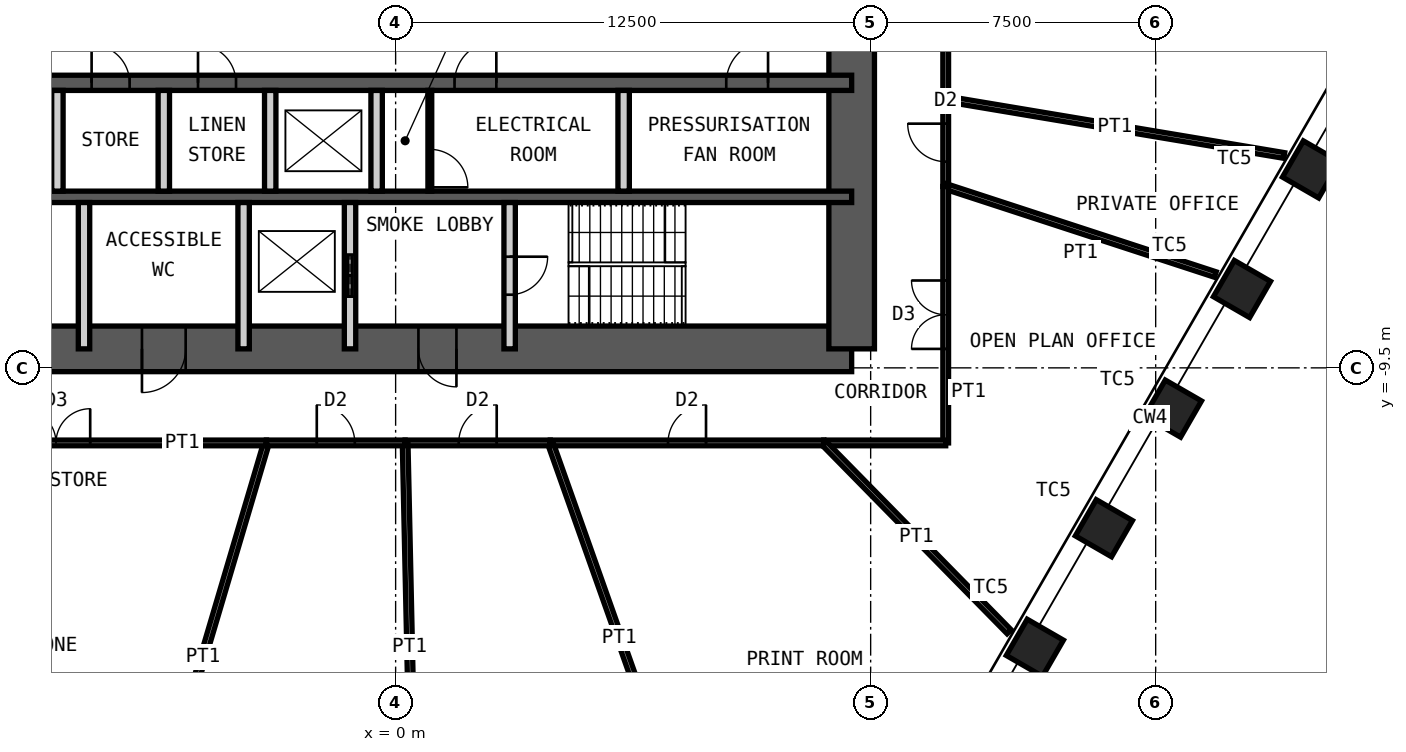
"""IFC4 building model, lengths in metres.
Left out: names, types, materials, properties, quantities, classifications, styles, units other than length and angle.
Written with IfcOpenShell. Run it as: python <this file> out.ifc"""

import sys

from ifc_helpers import new_model, si_unit, direction, frame, frame_2d, origin, origin_2d, place, context, subcontext, project, spatial, rectangle, hollow_rectangle, extrude, element, fill, save


model = new_model("IFC4")
c1 = context("Model", 3, precision=1e-05, world=origin(), true_north=direction((0.0, 1.0)))
c2 = subcontext(c1, "Body", "Model", "MODEL_VIEW")
j1 = project(units=[si_unit("LENGTHUNIT", "METRE"), si_unit("PLANEANGLEUNIT", "RADIAN")], contexts=[c1])
p1 = place(None, origin())
s1 = spatial("IfcSite", under=j1, at=p1, CompositionType="ELEMENT")
p2 = place(p1, origin())
s2 = spatial("IfcBuilding", under=s1, at=p2, CompositionType="ELEMENT")
p3 = place(p2, frame((0.0, 0.0, 209.8)))
s3 = spatial("IfcBuildingStorey", under=s2, at=p3, CompositionType="ELEMENT", Elevation=209.8)
for number, where, z_axis, x_axis in (
    (1, (24.088, -4.279, 0.0), (0.0, 0.0, 1.0), (0.5, 0.866, 0.0)),
    (2, (22.271, -7.426, 0.0), (0.0, 0.0, 1.0), (0.5, 0.866, 0.0)),
    (3, (20.454, -10.572, 0.0), (0.0, 0.0, 1.0), (0.5, 0.866, 0.0)),
    (4, (18.637, -13.719, 0.0), (0.0, 0.0, 1.0), (0.5, 0.866, 0.0)),
    (5, (16.821, -16.866, 0.0), (0.0, 0.0, 1.0), (0.5, 0.866, 0.0)),
):
    element("IfcColumn", number, at=place(p3, frame(where, z_axis=z_axis, x_axis=x_axis)), inside=s3, PredefinedType="COLUMN", context=c2, shape_type="SweptSolid", body=[
        extrude(hollow_rectangle(XDim=1.1, YDim=1.1, WallThickness=0.07, at=origin_2d()), origin(), (0.0, 0.0, 1.0), 4.2),
    ])
p4 = place(p3, frame((-12.0, -9.0, 0.0), z_axis=(0.0, 0.0, 1.0), x_axis=(1.0, 0.0, 0.0)))
e6 = element("IfcWall", 6, at=p4, inside=s3, PredefinedType="SHEAR", context=c2, shape_type="SweptSolid", body=[
    extrude(rectangle(XDim=24.0, YDim=1.2, at=frame_2d((12.0, 0.0))), origin(), (0.0, 0.0, 1.0), 4.2),
])
p5 = place(p4, frame((1.35, 0.0, 0.0)))
e7 = element("IfcOpeningElement", 7, at=p5, cuts=e6, PredefinedType="OPENING", context=c2, shape_type="SweptSolid", body=[
    extrude(rectangle(XDim=1.0, YDim=2.1, at=frame_2d((0.5, 1.05))), frame((0.0, 0.61, 0.0), z_axis=(0.0, -1.0, 0.0), x_axis=(1.0, 0.0, 0.0)), (0.0, 0.0, 1.0), 1.22),
])
p6 = place(p4, frame((5.325, 0.0, 0.0)))
e8 = element("IfcOpeningElement", 8, at=p6, cuts=e6, PredefinedType="OPENING", context=c2, shape_type="SweptSolid", body=[
    extrude(rectangle(XDim=1.15, YDim=2.1, at=frame_2d((0.575, 1.05))), frame((0.0, 0.61, 0.0), z_axis=(0.0, -1.0, 0.0), x_axis=(1.0, 0.0, 0.0)), (0.0, 0.0, 1.0), 1.22),
])
p7 = place(p4, frame((12.6, 0.0, 0.0)))
e9 = element("IfcOpeningElement", 9, at=p7, cuts=e6, PredefinedType="OPENING", context=c2, shape_type="SweptSolid", body=[
    extrude(rectangle(XDim=1.0, YDim=2.1, at=frame_2d((0.5, 1.05))), frame((0.0, 0.61, 0.0), z_axis=(0.0, -1.0, 0.0), x_axis=(1.0, 0.0, 0.0)), (0.0, 0.0, 1.0), 1.22),
])
p8 = place(p3, frame((12.0, -9.0, 0.0), z_axis=(0.0, 0.0, 1.0), x_axis=(0.0, 1.0, 0.0)))
e10 = element("IfcWall", 10, at=p8, inside=s3, PredefinedType="SHEAR", context=c2, shape_type="SweptSolid", body=[
    extrude(rectangle(XDim=18.0, YDim=1.2, at=frame_2d((9.0, 0.0))), origin(), (0.0, 0.0, 1.0), 4.2),
])
p9 = place(p8, frame((8.1, 0.0, 0.0)))
e11 = element("IfcOpeningElement", 11, at=p9, cuts=e10, PredefinedType="OPENING", context=c2, shape_type="SweptSolid", body=[
    extrude(rectangle(XDim=1.8, YDim=2.1, at=frame_2d((0.9, 1.05))), frame((0.0, 0.61, 0.0), z_axis=(0.0, -1.0, 0.0), x_axis=(1.0, 0.0, 0.0)), (0.0, 0.0, 1.0), 1.22),
])
p10 = place(p3, frame((-12.0, -2.0, 0.0), z_axis=(0.0, 0.0, 1.0), x_axis=(1.0, 0.0, 0.0)))
e12 = element("IfcWall", 12, at=p10, inside=s3, PredefinedType="SHEAR", context=c2, shape_type="SweptSolid", body=[
    extrude(rectangle(XDim=24.0, YDim=0.4, at=frame_2d((12.0, 0.0))), origin(), (0.0, 0.0, 1.0), 4.2),
])
p11 = place(p10, frame((1.1, 0.0, 0.0)))
e13 = element("IfcOpeningElement", 13, at=p11, cuts=e12, PredefinedType="OPENING", context=c2, shape_type="SweptSolid", body=[
    extrude(rectangle(XDim=1.1, YDim=2.1, at=frame_2d((0.55, 1.05))), frame((0.0, 0.21, 0.0), z_axis=(0.0, -1.0, 0.0), x_axis=(1.0, 0.0, 0.0)), (0.0, 0.0, 1.0), 0.42),
])
p12 = place(p10, frame((13.55, 0.0, 0.0)))
e14 = element("IfcOpeningElement", 14, at=p12, cuts=e12, PredefinedType="OPENING", context=c2, shape_type="SweptSolid", body=[
    extrude(rectangle(XDim=1.1, YDim=2.1, at=frame_2d((0.55, 1.05))), frame((0.0, 0.21, 0.0), z_axis=(0.0, -1.0, 0.0), x_axis=(1.0, 0.0, 0.0)), (0.0, 0.0, 1.0), 0.42),
])
p13 = place(p10, frame((20.7, 0.0, 0.0)))
e15 = element("IfcOpeningElement", 15, at=p13, cuts=e12, PredefinedType="OPENING", context=c2, shape_type="SweptSolid", body=[
    extrude(rectangle(XDim=1.1, YDim=2.1, at=frame_2d((0.55, 1.05))), frame((0.0, 0.21, 0.0), z_axis=(0.0, -1.0, 0.0), x_axis=(1.0, 0.0, 0.0)), (0.0, 0.0, 1.0), 0.42),
])
p14 = place(p10, frame((4.0, 0.0, 0.0)))
e16 = element("IfcOpeningElement", 16, at=p14, cuts=e12, PredefinedType="OPENING", context=c2, shape_type="SweptSolid", body=[
    extrude(rectangle(XDim=1.0, YDim=2.1, at=frame_2d((0.5, 1.05))), frame((0.0, 0.21, 0.0), z_axis=(0.0, -1.0, 0.0), x_axis=(1.0, 0.0, 0.0)), (0.0, 0.0, 1.0), 0.42),
])
p15 = place(p10, frame((6.8, 0.0, 0.0)))
e17 = element("IfcOpeningElement", 17, at=p15, cuts=e12, PredefinedType="OPENING", context=c2, shape_type="SweptSolid", body=[
    extrude(rectangle(XDim=1.0, YDim=2.1, at=frame_2d((0.5, 1.05))), frame((0.0, 0.21, 0.0), z_axis=(0.0, -1.0, 0.0), x_axis=(1.0, 0.0, 0.0)), (0.0, 0.0, 1.0), 0.42),
])
p16 = place(p3, frame((-12.0, -5.0, 0.0), z_axis=(0.0, 0.0, 1.0), x_axis=(1.0, 0.0, 0.0)))
e18 = element("IfcWall", 18, at=p16, inside=s3, PredefinedType="SHEAR", context=c2, shape_type="SweptSolid", body=[
    extrude(rectangle(XDim=24.0, YDim=0.3, at=frame_2d((12.0, 0.0))), origin(), (0.0, 0.0, 1.0), 4.2),
])
for number, where, z_axis, x_axis in (
    (19, (-8.9, -4.85, 0.0), (0.0, 0.0, 1.0), (0.0, 1.0, 0.0)),
    (20, (-6.1, -4.85, 0.0), (0.0, 0.0, 1.0), (0.0, 1.0, 0.0)),
    (21, (-3.3, -4.85, 0.0), (0.0, 0.0, 1.0), (0.0, 1.0, 0.0)),
    (22, (-0.5, -4.85, 0.0), (0.0, 0.0, 1.0), (0.0, 1.0, 0.0)),
    (23, (6.0, -4.85, 0.0), (0.0, 0.0, 1.0), (0.0, 1.0, 0.0)),
):
    element("IfcWall", number, at=place(p3, frame(where, z_axis=z_axis, x_axis=x_axis)), inside=s3, PredefinedType="PARTITIONING", context=c2, shape_type="SweptSolid", body=[
        extrude(rectangle(XDim=2.65, YDim=0.3, at=frame_2d((1.325, 0.0))), origin(), (0.0, 0.0, 1.0), 3.98),
    ])
for number, where, z_axis, x_axis in (
    (24, (-8.2, -9.0, 0.0), (0.0, 0.0, 1.0), (0.0, 1.0, 0.0)),
    (25, (-4.0, -9.0, 0.0), (0.0, 0.0, 1.0), (0.0, 1.0, 0.0)),
):
    element("IfcWall", number, at=place(p3, frame(where, z_axis=z_axis, x_axis=x_axis)), inside=s3, PredefinedType="PARTITIONING", context=c2, shape_type="SweptSolid", body=[
        extrude(rectangle(XDim=3.85, YDim=0.3, at=frame_2d((1.925, 0.0))), origin(), (0.0, 0.0, 1.0), 3.98),
    ])
p17 = place(p3, frame((-1.2, -9.0, 0.0), z_axis=(0.0, 0.0, 1.0), x_axis=(0.0, 1.0, 0.0)))
e26 = element("IfcWall", 26, at=p17, inside=s3, PredefinedType="PARTITIONING", context=c2, shape_type="SweptSolid", body=[
    extrude(rectangle(XDim=3.85, YDim=0.3, at=frame_2d((1.925, 0.0))), origin(), (0.0, 0.0, 1.0), 3.98),
])
p18 = place(p17, frame((1.375, 0.0, 0.0)))
e27 = element("IfcOpeningElement", 27, at=p18, cuts=e26, PredefinedType="OPENING", context=c2, shape_type="SweptSolid", body=[
    extrude(rectangle(XDim=1.1, YDim=2.4, at=frame_2d((0.55, 1.2))), frame((0.0, 0.16, 0.0), z_axis=(0.0, -1.0, 0.0), x_axis=(1.0, 0.0, 0.0)), (0.0, 0.0, 1.0), 0.32),
])
p19 = place(p3, frame((3.0, -9.0, 0.0), z_axis=(0.0, 0.0, 1.0), x_axis=(0.0, 1.0, 0.0)))
e28 = element("IfcWall", 28, at=p19, inside=s3, PredefinedType="PARTITIONING", context=c2, shape_type="SweptSolid", body=[
    extrude(rectangle(XDim=3.85, YDim=0.3, at=frame_2d((1.925, 0.0))), origin(), (0.0, 0.0, 1.0), 3.98),
])
p20 = place(p19, frame((1.425, 0.0, 0.0)))
e29 = element("IfcOpeningElement", 29, at=p20, cuts=e28, PredefinedType="OPENING", context=c2, shape_type="SweptSolid", body=[
    extrude(rectangle(XDim=1.0, YDim=2.1, at=frame_2d((0.5, 1.05))), frame((0.0, 0.16, 0.0), z_axis=(0.0, -1.0, 0.0), x_axis=(1.0, 0.0, 0.0)), (0.0, 0.0, 1.0), 0.32),
])
p21 = place(p3, frame((0.9, -4.85, 0.0), z_axis=(0.0, 0.0, 1.0), x_axis=(0.0, 1.0, 0.0)))
e30 = element("IfcWall", 30, at=p21, inside=s3, PredefinedType="PARTITIONING", context=c2, shape_type="SweptSolid", body=[
    extrude(rectangle(XDim=2.65, YDim=0.1, at=frame_2d((1.325, 0.0))), origin(), (0.0, 0.0, 1.0), 3.98),
])
p22 = place(p21, frame((0.1, 0.0, 0.0)))
e31 = element("IfcOpeningElement", 31, at=p22, cuts=e30, PredefinedType="OPENING", context=c2, shape_type="SweptSolid", body=[
    extrude(rectangle(XDim=1.0, YDim=2.4, at=frame_2d((0.5, 1.2))), frame((0.0, 0.06, 0.0), z_axis=(0.0, -1.0, 0.0), x_axis=(1.0, 0.0, 0.0)), (0.0, 0.0, 1.0), 0.12),
])
p23 = place(p3, frame((-6.734, -22.731, 0.0), z_axis=(0.0, 0.0, 1.0), x_axis=(0.284049386564, 0.958809650553, 0.0)))
e32 = element("IfcWall", 32, at=p23, inside=s3, PredefinedType="PARTITIONING", context=c2, shape_type="SweptSolid", body=[
    extrude(rectangle(XDim=11.74, YDim=0.15, at=frame_2d((5.87, 0.0))), origin(), (0.0, 0.0, 1.0), 3.33),
])
p24 = place(p3, frame((-3.399, -11.475, 0.0), z_axis=(0.0, 0.0, 1.0), x_axis=(-1.0, 0.0, 0.0)))
e33 = element("IfcWall", 33, at=p24, inside=s3, PredefinedType="PARTITIONING", context=c2, shape_type="SweptSolid", body=[
    extrude(rectangle(XDim=11.076, YDim=0.15, at=frame_2d((5.538, 0.0))), origin(), (0.0, 0.0, 1.0), 4.03),
])
p25 = place(p24, frame((4.638, 0.0, 0.0)))
e34 = element("IfcOpeningElement", 34, at=p25, cuts=e33, PredefinedType="OPENING", context=c2, shape_type="SweptSolid", body=[
    extrude(rectangle(XDim=1.8, YDim=2.4, at=frame_2d((0.9, 1.2))), frame((0.0, 0.085, 0.0), z_axis=(0.0, -1.0, 0.0), x_axis=(1.0, 0.0, 0.0)), (0.0, 0.0, 1.0), 0.17),
])
p26 = place(p3, frame((14.475, 1.463, 0.0), z_axis=(0.0, 0.0, 1.0), x_axis=(0.0, -1.0, 0.0)))
e35 = element("IfcWall", 35, at=p26, inside=s3, PredefinedType="PARTITIONING", context=c2, shape_type="SweptSolid", body=[
    extrude(rectangle(XDim=3.885, YDim=0.15, at=frame_2d((1.942, 0.0))), origin(), (0.0, 0.0, 1.0), 4.03),
])
p27 = place(p26, frame((1.442, 0.0, 0.0)))
e36 = element("IfcOpeningElement", 36, at=p27, cuts=e35, PredefinedType="OPENING", context=c2, shape_type="SweptSolid", body=[
    extrude(rectangle(XDim=1.0, YDim=2.4, at=frame_2d((0.5, 1.2))), frame((0.0, 0.085, 0.0), z_axis=(0.0, -1.0, 0.0), x_axis=(1.0, 0.0, 0.0)), (0.0, 0.0, 1.0), 0.17),
])
p28 = place(p3, frame((23.383, -3.912, 0.0), z_axis=(0.0, 0.0, 1.0), x_axis=(-0.986293651891, 0.164999491631, 0.0)))
e37 = element("IfcWall", 37, at=p28, inside=s3, PredefinedType="PARTITIONING", context=c2, shape_type="SweptSolid", body=[
    extrude(rectangle(XDim=9.032, YDim=0.15, at=frame_2d((4.516, 0.0))), origin(), (0.0, 0.0, 1.0), 3.43),
])
p29 = place(p3, frame((14.475, -2.422, 0.0), z_axis=(0.0, 0.0, 1.0), x_axis=(0.0, -1.0, 0.0)))
e38 = element("IfcWall", 38, at=p29, inside=s3, PredefinedType="PARTITIONING", context=c2, shape_type="SweptSolid", body=[
    extrude(rectangle(XDim=2.305, YDim=0.15, at=frame_2d((1.153, 0.0))), origin(), (0.0, 0.0, 1.0), 4.03),
])
p30 = place(p29, frame((0.653, 0.0, 0.0)))
e39 = element("IfcOpeningElement", 39, at=p30, cuts=e38, PredefinedType="OPENING", context=c2, shape_type="SweptSolid", body=[
    extrude(rectangle(XDim=1.0, YDim=2.4, at=frame_2d((0.5, 1.2))), frame((0.0, 0.085, 0.0), z_axis=(0.0, -1.0, 0.0), x_axis=(1.0, 0.0, 0.0)), (0.0, 0.0, 1.0), 0.17),
])
p31 = place(p3, frame((21.57, -7.044, 0.0), z_axis=(0.0, 0.0, 1.0), x_axis=(-0.950585953502, 0.310461503258, 0.0)))
e40 = element("IfcWall", 40, at=p31, inside=s3, PredefinedType="PARTITIONING", context=c2, shape_type="SweptSolid", body=[
    extrude(rectangle(XDim=7.464, YDim=0.15, at=frame_2d((3.732, 0.0))), origin(), (0.0, 0.0, 1.0), 3.43),
])
p32 = place(p3, frame((14.475, -4.727, 0.0), z_axis=(0.0, 0.0, 1.0), x_axis=(0.0, -1.0, 0.0)))
e41 = element("IfcWall", 41, at=p32, inside=s3, PredefinedType="PARTITIONING", context=c2, shape_type="SweptSolid", body=[
    extrude(rectangle(XDim=6.748, YDim=0.15, at=frame_2d((3.374, 0.0))), origin(), (0.0, 0.0, 1.0), 4.03),
])
p33 = place(p32, frame((2.474, 0.0, 0.0)))
e42 = element("IfcOpeningElement", 42, at=p33, cuts=e41, PredefinedType="OPENING", context=c2, shape_type="SweptSolid", body=[
    extrude(rectangle(XDim=1.8, YDim=2.4, at=frame_2d((0.9, 1.2))), frame((0.0, 0.085, 0.0), z_axis=(0.0, -1.0, 0.0), x_axis=(1.0, 0.0, 0.0)), (0.0, 0.0, 1.0), 0.17),
])
p34 = place(p3, frame((14.475, -11.475, 0.0), z_axis=(0.0, 0.0, 1.0), x_axis=(-1.0, 0.0, 0.0)))
e43 = element("IfcWall", 43, at=p34, inside=s3, PredefinedType="PARTITIONING", context=c2, shape_type="SweptSolid", body=[
    extrude(rectangle(XDim=3.209, YDim=0.15, at=frame_2d((1.605, 0.0))), origin(), (0.0, 0.0, 1.0), 4.03),
])
p35 = place(p3, frame((16.145, -16.444, 0.0), z_axis=(0.0, 0.0, 1.0), x_axis=(-0.700591378209, 0.71356269576, 0.0)))
e44 = element("IfcWall", 44, at=p35, inside=s3, PredefinedType="PARTITIONING", context=c2, shape_type="SweptSolid", body=[
    extrude(rectangle(XDim=6.964, YDim=0.15, at=frame_2d((3.482, 0.0))), origin(), (0.0, 0.0, 1.0), 3.43),
])
p36 = place(p3, frame((11.266, -11.475, 0.0), z_axis=(0.0, 0.0, 1.0), x_axis=(-1.0, 0.0, 0.0)))
e45 = element("IfcWall", 45, at=p36, inside=s3, PredefinedType="PARTITIONING", context=c2, shape_type="SweptSolid", body=[
    extrude(rectangle(XDim=7.196, YDim=0.15, at=frame_2d((3.598, 0.0))), origin(), (0.0, 0.0, 1.0), 4.03),
])
p37 = place(p36, frame((3.098, 0.0, 0.0)))
e46 = element("IfcOpeningElement", 46, at=p37, cuts=e45, PredefinedType="OPENING", context=c2, shape_type="SweptSolid", body=[
    extrude(rectangle(XDim=1.0, YDim=2.4, at=frame_2d((0.5, 1.2))), frame((0.0, 0.085, 0.0), z_axis=(0.0, -1.0, 0.0), x_axis=(1.0, 0.0, 0.0)), (0.0, 0.0, 1.0), 0.17),
])
p38 = place(p3, frame((7.703, -21.719, 0.0), z_axis=(0.0, 0.0, 1.0), x_axis=(-0.334269551553, 0.942477515331, 0.0)))
e47 = element("IfcWall", 47, at=p38, inside=s3, PredefinedType="PARTITIONING", context=c2, shape_type="SweptSolid", body=[
    extrude(rectangle(XDim=10.869, YDim=0.15, at=frame_2d((5.435, 0.0))), origin(), (0.0, 0.0, 1.0), 3.43),
])
p39 = place(p3, frame((4.07, -11.475, 0.0), z_axis=(0.0, 0.0, 1.0), x_axis=(-1.0, 0.0, 0.0)))
e48 = element("IfcWall", 48, at=p39, inside=s3, PredefinedType="PARTITIONING", context=c2, shape_type="SweptSolid", body=[
    extrude(rectangle(XDim=3.819, YDim=0.15, at=frame_2d((1.91, 0.0))), origin(), (0.0, 0.0, 1.0), 4.03),
])
p40 = place(p39, frame((1.41, 0.0, 0.0)))
e49 = element("IfcOpeningElement", 49, at=p40, cuts=e48, PredefinedType="OPENING", context=c2, shape_type="SweptSolid", body=[
    extrude(rectangle(XDim=1.0, YDim=2.4, at=frame_2d((0.5, 1.2))), frame((0.0, 0.085, 0.0), z_axis=(0.0, -1.0, 0.0), x_axis=(1.0, 0.0, 0.0)), (0.0, 0.0, 1.0), 0.17),
])
p41 = place(p3, frame((0.485, -22.22, 0.0), z_axis=(0.0, 0.0, 1.0), x_axis=(-0.021806550804, 0.999762208899, 0.0)))
e50 = element("IfcWall", 50, at=p41, inside=s3, PredefinedType="PARTITIONING", context=c2, shape_type="SweptSolid", body=[
    extrude(rectangle(XDim=10.748, YDim=0.15, at=frame_2d((5.374, 0.0))), origin(), (0.0, 0.0, 1.0), 3.43),
])
p42 = place(p3, frame((0.25, -11.475, 0.0), z_axis=(0.0, 0.0, 1.0), x_axis=(-1.0, 0.0, 0.0)))
e51 = element("IfcWall", 51, at=p42, inside=s3, PredefinedType="PARTITIONING", context=c2, shape_type="SweptSolid", body=[
    extrude(rectangle(XDim=3.65, YDim=0.15, at=frame_2d((1.825, 0.0))), origin(), (0.0, 0.0, 1.0), 4.03),
])
p43 = place(p42, frame((1.325, 0.0, 0.0)))
e52 = element("IfcOpeningElement", 52, at=p43, cuts=e51, PredefinedType="OPENING", context=c2, shape_type="SweptSolid", body=[
    extrude(rectangle(XDim=1.0, YDim=2.4, at=frame_2d((0.5, 1.2))), frame((0.0, 0.085, 0.0), z_axis=(0.0, -1.0, 0.0), x_axis=(1.0, 0.0, 0.0)), (0.0, 0.0, 1.0), 0.17),
])
p44 = place(p6, origin())
e53 = element("IfcDoor", 53, at=p44, inside=s3, OperationType="SINGLE_SWING_LEFT", PredefinedType="DOOR", context=c2, shape_type="SweptSolid", body=[
    extrude(rectangle(XDim=1.15, YDim=2.1, at=frame_2d((0.575, 1.05))), frame((0.0, 0.025, 0.0), z_axis=(0.0, -1.0, 0.0), x_axis=(1.0, 0.0, 0.0)), (0.0, 0.0, 1.0), 0.05),
])
fill(e8, e53)
p45 = place(p7, origin())
e54 = element("IfcDoor", 54, at=p45, inside=s3, OperationType="SINGLE_SWING_RIGHT", PredefinedType="DOOR", context=c2, shape_type="SweptSolid", body=[
    extrude(rectangle(XDim=1.0, YDim=2.1, at=frame_2d((0.5, 1.05))), frame((0.0, 0.025, 0.0), z_axis=(0.0, -1.0, 0.0), x_axis=(1.0, 0.0, 0.0)), (0.0, 0.0, 1.0), 0.05),
])
fill(e9, e54)
p46 = place(p20, origin())
e55 = element("IfcDoor", 55, at=p46, inside=s3, OperationType="SINGLE_SWING_RIGHT", PredefinedType="DOOR", context=c2, shape_type="SweptSolid", body=[
    extrude(rectangle(XDim=1.0, YDim=2.1, at=frame_2d((0.5, 1.05))), frame((0.0, 0.025, 0.0), z_axis=(0.0, -1.0, 0.0), x_axis=(1.0, 0.0, 0.0)), (0.0, 0.0, 1.0), 0.05),
])
fill(e29, e55)
p47 = place(p12, origin())
e56 = element("IfcDoor", 56, at=p47, inside=s3, OperationType="SINGLE_SWING_LEFT", PredefinedType="DOOR", context=c2, shape_type="SweptSolid", body=[
    extrude(rectangle(XDim=1.1, YDim=2.1, at=frame_2d((0.55, 1.05))), frame((0.0, 0.025, 0.0), z_axis=(0.0, -1.0, 0.0), x_axis=(1.0, 0.0, 0.0)), (0.0, 0.0, 1.0), 0.05),
])
fill(e14, e56)
p48 = place(p13, origin())
e57 = element("IfcDoor", 57, at=p48, inside=s3, OperationType="SINGLE_SWING_LEFT", PredefinedType="DOOR", context=c2, shape_type="SweptSolid", body=[
    extrude(rectangle(XDim=1.1, YDim=2.1, at=frame_2d((0.55, 1.05))), frame((0.0, 0.025, 0.0), z_axis=(0.0, -1.0, 0.0), x_axis=(1.0, 0.0, 0.0)), (0.0, 0.0, 1.0), 0.05),
])
fill(e15, e57)
p49 = place(p18, origin())
e58 = element("IfcDoor", 58, at=p49, inside=s3, OperationType="DOUBLE_DOOR_SLIDING", PredefinedType="DOOR", context=c2, shape_type="SweptSolid", body=[
    extrude(rectangle(XDim=1.1, YDim=2.4, at=frame_2d((0.55, 1.2))), frame((0.0, 0.025, 0.0), z_axis=(0.0, -1.0, 0.0), x_axis=(1.0, 0.0, 0.0)), (0.0, 0.0, 1.0), 0.05),
])
fill(e27, e58)
p50 = place(p14, origin())
e59 = element("IfcDoor", 59, at=p50, inside=s3, OperationType="SINGLE_SWING_RIGHT", PredefinedType="DOOR", context=c2, shape_type="SweptSolid", body=[
    extrude(rectangle(XDim=1.0, YDim=2.1, at=frame_2d((0.5, 1.05))), frame((0.0, 0.025, 0.0), z_axis=(0.0, -1.0, 0.0), x_axis=(1.0, 0.0, 0.0)), (0.0, 0.0, 1.0), 0.05),
])
fill(e16, e59)
p51 = place(p15, origin())
e60 = element("IfcDoor", 60, at=p51, inside=s3, OperationType="SINGLE_SWING_RIGHT", PredefinedType="DOOR", context=c2, shape_type="SweptSolid", body=[
    extrude(rectangle(XDim=1.0, YDim=2.1, at=frame_2d((0.5, 1.05))), frame((0.0, 0.025, 0.0), z_axis=(0.0, -1.0, 0.0), x_axis=(1.0, 0.0, 0.0)), (0.0, 0.0, 1.0), 0.05),
])
fill(e17, e60)
p52 = place(p22, origin())
e61 = element("IfcDoor", 61, at=p52, inside=s3, OperationType="SINGLE_SWING_LEFT", PredefinedType="DOOR", context=c2, shape_type="SweptSolid", body=[
    extrude(rectangle(XDim=1.0, YDim=2.4, at=frame_2d((0.5, 1.2))), frame((0.0, 0.025, 0.0), z_axis=(0.0, -1.0, 0.0), x_axis=(1.0, 0.0, 0.0)), (0.0, 0.0, 1.0), 0.05),
])
fill(e31, e61)
p53 = place(p25, origin())
e62 = element("IfcDoor", 62, at=p53, inside=s3, OperationType="DOUBLE_DOOR_DOUBLE_SWING", PredefinedType="DOOR", context=c2, shape_type="SweptSolid", body=[
    extrude(rectangle(XDim=1.8, YDim=2.4, at=frame_2d((0.9, 1.2))), frame((0.0, 0.025, 0.0), z_axis=(0.0, -1.0, 0.0), x_axis=(1.0, 0.0, 0.0)), (0.0, 0.0, 1.0), 0.05),
])
fill(e34, e62)
p54 = place(p30, origin())
e63 = element("IfcDoor", 63, at=p54, inside=s3, OperationType="SINGLE_SWING_LEFT", PredefinedType="DOOR", context=c2, shape_type="SweptSolid", body=[
    extrude(rectangle(XDim=1.0, YDim=2.4, at=frame_2d((0.5, 1.2))), frame((0.0, 0.025, 0.0), z_axis=(0.0, -1.0, 0.0), x_axis=(1.0, 0.0, 0.0)), (0.0, 0.0, 1.0), 0.05),
])
fill(e39, e63)
p55 = place(p33, origin())
e64 = element("IfcDoor", 64, at=p55, inside=s3, OperationType="DOUBLE_DOOR_DOUBLE_SWING", PredefinedType="DOOR", context=c2, shape_type="SweptSolid", body=[
    extrude(rectangle(XDim=1.8, YDim=2.4, at=frame_2d((0.9, 1.2))), frame((0.0, 0.025, 0.0), z_axis=(0.0, -1.0, 0.0), x_axis=(1.0, 0.0, 0.0)), (0.0, 0.0, 1.0), 0.05),
])
fill(e42, e64)
p56 = place(p37, origin())
e65 = element("IfcDoor", 65, at=p56, inside=s3, OperationType="SINGLE_SWING_LEFT", PredefinedType="DOOR", context=c2, shape_type="SweptSolid", body=[
    extrude(rectangle(XDim=1.0, YDim=2.4, at=frame_2d((0.5, 1.2))), frame((0.0, 0.025, 0.0), z_axis=(0.0, -1.0, 0.0), x_axis=(1.0, 0.0, 0.0)), (0.0, 0.0, 1.0), 0.05),
])
fill(e46, e65)
p57 = place(p40, origin())
e66 = element("IfcDoor", 66, at=p57, inside=s3, OperationType="SINGLE_SWING_LEFT", PredefinedType="DOOR", context=c2, shape_type="SweptSolid", body=[
    extrude(rectangle(XDim=1.0, YDim=2.4, at=frame_2d((0.5, 1.2))), frame((0.0, 0.025, 0.0), z_axis=(0.0, -1.0, 0.0), x_axis=(1.0, 0.0, 0.0)), (0.0, 0.0, 1.0), 0.05),
])
fill(e49, e66)
p58 = place(p43, origin())
e67 = element("IfcDoor", 67, at=p58, inside=s3, OperationType="SINGLE_SWING_RIGHT", PredefinedType="DOOR", context=c2, shape_type="SweptSolid", body=[
    extrude(rectangle(XDim=1.0, YDim=2.4, at=frame_2d((0.5, 1.2))), frame((0.0, 0.025, 0.0), z_axis=(0.0, -1.0, 0.0), x_axis=(1.0, 0.0, 0.0)), (0.0, 0.0, 1.0), 0.05),
])
fill(e52, e67)
save(model, sys.argv[1])
